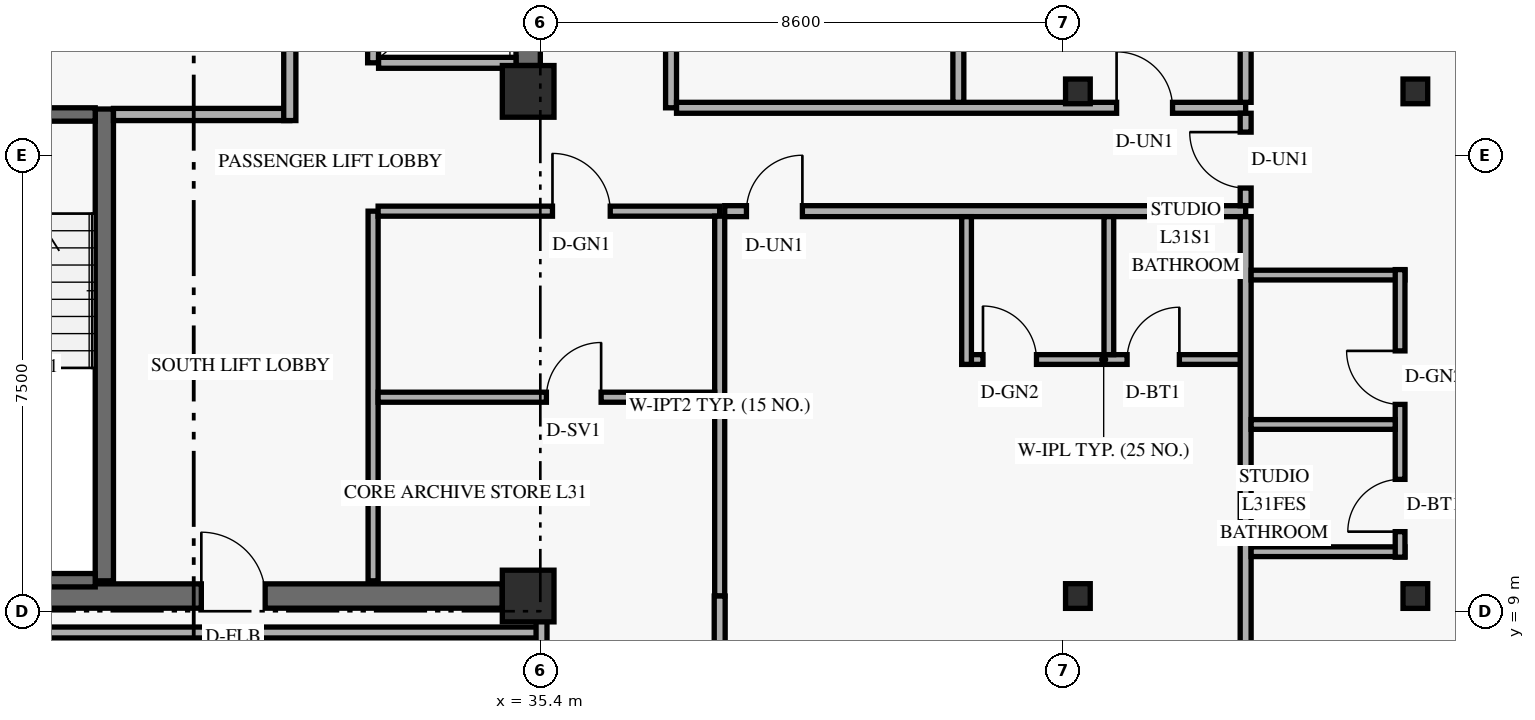
"""IFC4 building model, lengths in metres.
Left out: names, types, materials, properties, quantities, classifications, styles, units other than length and angle.
Written with IfcOpenShell. Run it as: python <this file> out.ifc"""

import sys

from ifc_helpers import new_model, si_unit, direction, frame, frame_2d, origin, origin_2d, place, context, subcontext, project, spatial, rectangle, hollow_rectangle, extrude, element, fill, save


model = new_model("IFC4")
c1 = context("Model", 3, precision=1e-05, world=origin(), true_north=direction((0.0, 1.0)))
c2 = subcontext(c1, "Body", "Model", "MODEL_VIEW")
j1 = project(units=[si_unit("LENGTHUNIT", "METRE"), si_unit("PLANEANGLEUNIT", "RADIAN")], contexts=[c1])
p1 = place(None, origin())
s1 = spatial("IfcSite", under=j1, at=p1, CompositionType="ELEMENT")
p2 = place(p1, origin())
s2 = spatial("IfcBuilding", under=s1, at=p2, CompositionType="ELEMENT")
p3 = place(p2, frame((0.0, 0.0, 121.2)))
s3 = spatial("IfcBuildingStorey", under=s2, at=p3, CompositionType="ELEMENT", Elevation=121.2)
p4 = place(p3, frame((35.2, 17.975, 0.0), z_axis=(0.0, 0.0, 1.0), x_axis=(0.0, 1.0, 0.0)))
e1 = element("IfcWall", 1, at=p4, inside=s3, PredefinedType="SHEAR", context=c2, shape_type="SweptSolid", body=[
    extrude(rectangle(XDim=10.125, YDim=0.4, at=frame_2d((5.062, 0.0))), origin(), (0.0, 0.0, 1.0), 2.749),
])
p5 = place(p3, frame((24.625, 9.25, 0.0), z_axis=(0.0, 0.0, 1.0), x_axis=(1.0, 0.0, 0.0)))
e2 = element("IfcWall", 2, at=p5, inside=s3, PredefinedType="SHEAR", context=c2, shape_type="SweptSolid", body=[
    extrude(rectangle(XDim=10.15, YDim=0.4, at=frame_2d((5.075, 0.0))), origin(), (0.0, 0.0, 1.0), 3.36),
])
p6 = place(p5, frame((5.2, 0.0, 0.0)))
e3 = element("IfcOpeningElement", 3, at=p6, cuts=e2, PredefinedType="OPENING", context=c2, shape_type="SweptSolid", body=[
    extrude(rectangle(XDim=1.05, YDim=2.15, at=frame_2d((0.525, 1.075))), frame((0.0, 0.21, 0.0), z_axis=(0.0, -1.0, 0.0), x_axis=(1.0, 0.0, 0.0)), (0.0, 0.0, 1.0), 0.42),
])
p7 = place(p3, frame((28.23, 9.5, 0.0), z_axis=(0.0, 0.0, 1.0), x_axis=(0.0, 1.0, 0.0)))
e4 = element("IfcWall", 4, at=p7, inside=s3, PredefinedType="SHEAR", context=c2, shape_type="SweptSolid", body=[
    extrude(rectangle(XDim=7.76, YDim=0.3, at=frame_2d((3.88, 0.0))), origin(), (0.0, 0.0, 1.0), 3.36),
])
p8 = place(p3, frame((24.92, 9.51, 0.0), z_axis=(0.0, 0.0, 1.0), x_axis=(1.0, 0.0, 0.0)))
e5 = element("IfcWall", 5, at=p8, inside=s3, PredefinedType="SHEAR", context=c2, shape_type="SweptSolid", body=[
    extrude(rectangle(XDim=3.16, YDim=0.22, at=frame_2d((1.58, 0.0))), origin(), (0.0, 0.0, 1.0), 3.36),
])
p9 = place(p3, frame((24.92, 17.17, 0.0), z_axis=(0.0, 0.0, 1.0), x_axis=(1.0, 0.0, 0.0)))
e6 = element("IfcWall", 6, at=p9, inside=s3, PredefinedType="SHEAR", context=c2, shape_type="SweptSolid", body=[
    extrude(rectangle(XDim=3.16, YDim=0.22, at=frame_2d((1.58, 0.0))), origin(), (0.0, 0.0, 1.0), 3.36),
])
p10 = place(p9, frame((0.78, 0.0, 0.0)))
e7 = element("IfcOpeningElement", 7, at=p10, cuts=e6, PredefinedType="OPENING", context=c2, shape_type="SweptSolid", body=[
    extrude(rectangle(XDim=1.05, YDim=2.15, at=frame_2d((0.525, 1.075))), frame((0.0, 0.12, 0.0), z_axis=(0.0, -1.0, 0.0), x_axis=(1.0, 0.0, 0.0)), (0.0, 0.0, 1.0), 0.24),
])
for number, where, z_axis, x_axis in (
    (8, (35.2, 9.25, 0.0), (0.0, 0.0, 1.0), (1.0, 0.0, 0.0)),
    (9, (35.2, 17.55, 0.0), (0.0, 0.0, 1.0), (1.0, 0.0, 0.0)),
):
    element("IfcColumn", number, at=place(p3, frame(where, z_axis=z_axis, x_axis=x_axis)), inside=s3, PredefinedType="COLUMN", context=c2, shape_type="SweptSolid", body=[
        extrude(rectangle(XDim=0.85, YDim=0.85, at=origin_2d()), origin(), (0.0, 0.0, 1.0), 3.6),
    ])
for number, where, z_axis, x_axis in (
    (10, (44.178, 9.25, 0.0), (0.035, 0.0, 0.999), (0.0, 1.0, 0.0)),
    (11, (44.178, 17.55, 0.0), (0.035, 0.0, 0.999), (0.0, 1.0, 0.0)),
):
    element("IfcColumn", number, at=place(p3, frame(where, z_axis=z_axis, x_axis=x_axis)), inside=s3, PredefinedType="COLUMN", context=c2, shape_type="SweptSolid", body=[
        extrude(hollow_rectangle(XDim=0.406, YDim=0.406, WallThickness=0.016, at=origin_2d()), origin(), (0.0, 0.0, 1.0), 3.602),
    ])
for number, where, z_axis, x_axis in (
    (12, (49.686, 9.25, 0.0), (0.058, 0.0, 0.998), (0.0, 1.0, 0.0)),
    (13, (49.686, 17.55, 0.0), (0.058, 0.0, 0.998), (0.0, 1.0, 0.0)),
):
    element("IfcColumn", number, at=place(p3, frame(where, z_axis=z_axis, x_axis=x_axis)), inside=s3, PredefinedType="COLUMN", context=c2, shape_type="SweptSolid", body=[
        extrude(hollow_rectangle(XDim=0.406, YDim=0.406, WallThickness=0.016, at=origin_2d()), origin(), (0.0, 0.0, 1.0), 3.606),
    ])
p11 = place(p3, frame((28.38, 17.17, 0.0), z_axis=(0.0, 0.0, 1.0), x_axis=(1.0, 0.0, 0.0)))
e14 = element("IfcWall", 14, at=p11, inside=s3, PredefinedType="STANDARD", context=c2, shape_type="SweptSolid", body=[
    extrude(rectangle(XDim=2.9, YDim=0.2, at=frame_2d((1.45, 0.0))), origin(), (0.0, 0.0, 1.0), 3.36),
])
p12 = place(p3, frame((31.28, 17.07, 0.0), z_axis=(0.0, 0.0, 1.0), x_axis=(0.0, 1.0, 0.0)))
e15 = element("IfcWall", 15, at=p12, inside=s3, PredefinedType="STANDARD", context=c2, shape_type="SweptSolid", body=[
    extrude(rectangle(XDim=3.92, YDim=0.2, at=frame_2d((1.96, 0.0))), origin(), (0.0, 0.0, 1.0), 2.731),
])
p13 = place(p12, frame((1.35, 0.0, 0.0)))
e16 = element("IfcOpeningElement", 16, at=p13, cuts=e15, PredefinedType="OPENING", context=c2, shape_type="SweptSolid", body=[
    extrude(rectangle(XDim=1.2, YDim=2.15, at=frame_2d((0.6, 1.075))), frame((0.0, 0.11, 0.0), z_axis=(0.0, -1.0, 0.0), x_axis=(1.0, 0.0, 0.0)), (0.0, 0.0, 1.0), 0.22),
])
p14 = place(p3, frame((32.65, 18.02, 0.0), z_axis=(0.0, 0.0, 1.0), x_axis=(0.0, 1.0, 0.0)))
e17 = element("IfcWall", 17, at=p14, inside=s3, PredefinedType="STANDARD", context=c2, shape_type="SweptSolid", body=[
    extrude(rectangle(XDim=10.06, YDim=0.18, at=frame_2d((5.03, 0.0))), origin(), (0.0, 0.0, 1.0), 3.36),
])
p15 = place(p3, frame((32.74, 18.02, 0.0), z_axis=(0.0, 0.0, 1.0), x_axis=(1.0, 0.0, 0.0)))
e18 = element("IfcWall", 18, at=p15, inside=s3, PredefinedType="STANDARD", context=c2, shape_type="SweptSolid", body=[
    extrude(rectangle(XDim=2.26, YDim=0.18, at=frame_2d((1.13, 0.0))), origin(), (0.0, 0.0, 1.0), 3.36),
])
p16 = place(p3, frame((32.65, 9.5, 0.0), z_axis=(0.0, 0.0, 1.0), x_axis=(0.0, 1.0, 0.0)))
e19 = element("IfcWall", 19, at=p16, inside=s3, PredefinedType="PARTITIONING", context=c2, shape_type="SweptSolid", body=[
    extrude(rectangle(XDim=6.08, YDim=0.165, at=frame_2d((3.04, 0.0))), origin(), (0.0, 0.0, 1.0), 3.36),
])
p17 = place(p3, frame((32.732, 15.58, 0.0), z_axis=(0.0, 0.0, 1.0), x_axis=(1.0, 0.0, 0.0)))
e20 = element("IfcWall", 20, at=p17, inside=s3, PredefinedType="PARTITIONING", context=c2, shape_type="SweptSolid", body=[
    extrude(rectangle(XDim=5.618, YDim=0.165, at=frame_2d((2.809, 0.0))), origin(), (0.0, 0.0, 1.0), 2.731),
])
p18 = place(p17, frame((2.867, 0.0, 0.0)))
e21 = element("IfcOpeningElement", 21, at=p18, cuts=e20, PredefinedType="OPENING", context=c2, shape_type="SweptSolid", body=[
    extrude(rectangle(XDim=0.95, YDim=2.15, at=frame_2d((0.475, 1.075))), frame((0.0, 0.093, 0.0), z_axis=(0.0, -1.0, 0.0), x_axis=(1.0, 0.0, 0.0)), (0.0, 0.0, 1.0), 0.185),
])
p19 = place(p3, frame((38.35, 9.25, 0.0), z_axis=(0.0, 0.0, 1.0), x_axis=(0.0, 1.0, 0.0)))
e22 = element("IfcWall", 22, at=p19, inside=s3, PredefinedType="PARTITIONING", context=c2, shape_type="SweptSolid", body=[
    extrude(rectangle(XDim=6.248, YDim=0.165, at=frame_2d((3.124, 0.0))), origin(), (0.0, 0.0, 1.0), 2.731),
])
p20 = place(p3, frame((32.732, 12.52, 0.0), z_axis=(0.0, 0.0, 1.0), x_axis=(1.0, 0.0, 0.0)))
e23 = element("IfcWall", 23, at=p20, inside=s3, PredefinedType="PARTITIONING", context=c2, shape_type="SweptSolid", body=[
    extrude(rectangle(XDim=5.535, YDim=0.165, at=frame_2d((2.768, 0.0))), origin(), (0.0, 0.0, 1.0), 2.731),
])
p21 = place(p20, frame((2.768, 0.0, 0.0)))
e24 = element("IfcOpeningElement", 24, at=p21, cuts=e23, PredefinedType="OPENING", context=c2, shape_type="SweptSolid", body=[
    extrude(rectangle(XDim=0.9, YDim=2.1, at=frame_2d((0.45, 1.05))), frame((0.0, 0.093, 0.0), z_axis=(0.0, -1.0, 0.0), x_axis=(1.0, 0.0, 0.0)), (0.0, 0.0, 1.0), 0.185),
])
p22 = place(p3, frame((37.55, 17.28, 0.0), z_axis=(0.0, 0.0, 1.0), x_axis=(0.0, 1.0, 0.0)))
e25 = element("IfcWall", 25, at=p22, inside=s3, PredefinedType="STANDARD", context=c2, shape_type="SweptSolid", body=[
    extrude(rectangle(XDim=10.28, YDim=0.18, at=frame_2d((5.14, 0.0))), origin(), (0.0, 0.0, 1.0), 2.731),
])
p23 = place(p22, frame((1.94, 0.0, 0.0)))
e26 = element("IfcOpeningElement", 26, at=p23, cuts=e25, PredefinedType="OPENING", context=c2, shape_type="SweptSolid", body=[
    extrude(rectangle(XDim=0.95, YDim=2.15, at=frame_2d((0.475, 1.075))), frame((0.0, 0.1, 0.0), z_axis=(0.0, -1.0, 0.0), x_axis=(1.0, 0.0, 0.0)), (0.0, 0.0, 1.0), 0.2),
])
p24 = place(p22, frame((6.99, 0.0, 0.0)))
e27 = element("IfcOpeningElement", 27, at=p24, cuts=e25, PredefinedType="OPENING", context=c2, shape_type="SweptSolid", body=[
    extrude(rectangle(XDim=0.95, YDim=2.15, at=frame_2d((0.475, 1.075))), frame((0.0, 0.1, 0.0), z_axis=(0.0, -1.0, 0.0), x_axis=(1.0, 0.0, 0.0)), (0.0, 0.0, 1.0), 0.2),
])
p25 = place(p3, frame((38.433, 15.58, 0.0), z_axis=(0.0, 0.0, 1.0), x_axis=(1.0, 0.0, 0.0)))
e28 = element("IfcWall", 28, at=p25, inside=s3, PredefinedType="STANDARD", context=c2, shape_type="SweptSolid", body=[
    extrude(rectangle(XDim=8.567, YDim=0.18, at=frame_2d((4.284, 0.0))), origin(), (0.0, 0.0, 1.0), 2.731),
])
p26 = place(p25, frame((0.357, 0.0, 0.0)))
e29 = element("IfcOpeningElement", 29, at=p26, cuts=e28, PredefinedType="OPENING", context=c2, shape_type="SweptSolid", body=[
    extrude(rectangle(XDim=0.92, YDim=2.15, at=frame_2d((0.46, 1.075))), frame((0.0, 0.1, 0.0), z_axis=(0.0, -1.0, 0.0), x_axis=(1.0, 0.0, 0.0)), (0.0, 0.0, 1.0), 0.2),
])
p27 = place(p3, frame((37.64, 17.28, 0.0), z_axis=(0.0, 0.0, 1.0), x_axis=(1.0, 0.0, 0.0)))
e30 = element("IfcWall", 30, at=p27, inside=s3, PredefinedType="STANDARD", context=c2, shape_type="SweptSolid", body=[
    extrude(rectangle(XDim=9.36, YDim=0.18, at=frame_2d((4.68, 0.0))), origin(), (0.0, 0.0, 1.0), 2.731),
])
p28 = place(p27, frame((7.238, 0.0, 0.0)))
e31 = element("IfcOpeningElement", 31, at=p28, cuts=e30, PredefinedType="OPENING", context=c2, shape_type="SweptSolid", body=[
    extrude(rectangle(XDim=0.92, YDim=2.15, at=frame_2d((0.46, 1.075))), frame((0.0, 0.1, 0.0), z_axis=(0.0, -1.0, 0.0), x_axis=(1.0, 0.0, 0.0)), (0.0, 0.0, 1.0), 0.2),
])
p29 = place(p3, frame((23.85, 8.65, 0.0), z_axis=(0.0, 0.0, 1.0), x_axis=(1.0, 0.0, 0.0)))
e32 = element("IfcWall", 32, at=p29, inside=s3, PredefinedType="STANDARD", context=c2, shape_type="SweptSolid", body=[
    extrude(rectangle(XDim=11.57, YDim=0.18, at=frame_2d((5.785, 0.0))), origin(), (0.0, 0.0, 1.0), 2.731),
])
p30 = place(p3, frame((35.42, 2.98, 0.0), z_axis=(0.0, 0.0, 1.0), x_axis=(0.0, 1.0, 0.0)))
e33 = element("IfcWall", 33, at=p30, inside=s3, PredefinedType="PARTITIONING", context=c2, shape_type="SweptSolid", body=[
    extrude(rectangle(XDim=6.27, YDim=0.18, at=frame_2d((3.135, 0.0))), origin(), (0.0, 0.0, 1.0), 2.731),
])
p31 = place(p30, frame((1.57, 0.0, 0.0)))
e34 = element("IfcOpeningElement", 34, at=p31, cuts=e33, PredefinedType="OPENING", context=c2, shape_type="SweptSolid", body=[
    extrude(rectangle(XDim=0.88, YDim=2.12, at=frame_2d((0.44, 1.06))), frame((0.0, 0.1, 0.0), z_axis=(0.0, -1.0, 0.0), x_axis=(1.0, 0.0, 0.0)), (0.0, 0.0, 1.0), 0.2),
])
p32 = place(p3, frame((38.35, 2.98, 0.0), z_axis=(0.0, 0.0, 1.0), x_axis=(0.0, 1.0, 0.0)))
e35 = element("IfcWall", 35, at=p32, inside=s3, PredefinedType="PARTITIONING", context=c2, shape_type="SweptSolid", body=[
    extrude(rectangle(XDim=6.27, YDim=0.18, at=frame_2d((3.135, 0.0))), origin(), (0.0, 0.0, 1.0), 2.731),
])
p33 = place(p3, frame((42.33, 13.14, 0.0), z_axis=(0.0, 0.0, 1.0), x_axis=(1.0, 0.0, 0.0)))
e36 = element("IfcWall", 36, at=p33, inside=s3, PredefinedType="PLUMBINGWALL", context=c2, shape_type="SweptSolid", body=[
    extrude(rectangle(XDim=4.67, YDim=0.16, at=frame_2d((2.335, 0.0))), origin(), (0.0, 0.0, 1.0), 2.731),
])
p34 = place(p33, frame((0.35, 0.0, 0.0)))
e37 = element("IfcOpeningElement", 37, at=p34, cuts=e36, PredefinedType="OPENING", context=c2, shape_type="SweptSolid", body=[
    extrude(rectangle(XDim=0.88, YDim=2.12, at=frame_2d((0.44, 1.06))), frame((0.0, 0.09, 0.0), z_axis=(0.0, -1.0, 0.0), x_axis=(1.0, 0.0, 0.0)), (0.0, 0.0, 1.0), 0.18),
])
p35 = place(p33, frame((2.72, 0.0, 0.0)))
e38 = element("IfcOpeningElement", 38, at=p35, cuts=e36, PredefinedType="OPENING", context=c2, shape_type="SweptSolid", body=[
    extrude(rectangle(XDim=0.86, YDim=2.12, at=frame_2d((0.43, 1.06))), frame((0.0, 0.09, 0.0), z_axis=(0.0, -1.0, 0.0), x_axis=(1.0, 0.0, 0.0)), (0.0, 0.0, 1.0), 0.18),
])
p36 = place(p3, frame((42.41, 13.06, 0.0), z_axis=(0.0, 0.0, 1.0), x_axis=(0.0, 1.0, 0.0)))
e39 = element("IfcWall", 39, at=p36, inside=s3, PredefinedType="PLUMBINGWALL", context=c2, shape_type="SweptSolid", body=[
    extrude(rectangle(XDim=2.43, YDim=0.16, at=frame_2d((1.215, 0.0))), origin(), (0.0, 0.0, 1.0), 2.988),
])
p37 = place(p3, frame((44.75, 13.22, 0.0), z_axis=(0.0, 0.0, 1.0), x_axis=(0.0, 1.0, 0.0)))
e40 = element("IfcWall", 40, at=p37, inside=s3, PredefinedType="PLUMBINGWALL", context=c2, shape_type="SweptSolid", body=[
    extrude(rectangle(XDim=2.27, YDim=0.16, at=frame_2d((1.135, 0.0))), origin(), (0.0, 0.0, 1.0), 2.988),
])
p38 = place(p3, frame((42.275, 17.37, 0.0), z_axis=(0.0, 0.0, 1.0), x_axis=(0.0, 1.0, 0.0)))
e41 = element("IfcWall", 41, at=p38, inside=s3, PredefinedType="PARTITIONING", context=c2, shape_type="SweptSolid", body=[
    extrude(rectangle(XDim=10.1, YDim=0.18, at=frame_2d((5.05, 0.0))), origin(), (0.0, 0.0, 1.0), 2.731),
])
p39 = place(p3, frame((47.0, 15.67, 0.0), z_axis=(0.0, 0.0, 1.0), x_axis=(0.0, 1.0, 0.0)))
e42 = element("IfcWall", 42, at=p39, inside=s3, PredefinedType="STANDARD", context=c2, shape_type="SweptSolid", body=[
    extrude(rectangle(XDim=1.52, YDim=0.18, at=frame_2d((0.76, 0.0))), origin(), (0.0, 0.0, 1.0), 3.36),
])
p40 = place(p39, frame((0.29, 0.0, 0.0)))
e43 = element("IfcOpeningElement", 43, at=p40, cuts=e42, PredefinedType="OPENING", context=c2, shape_type="SweptSolid", body=[
    extrude(rectangle(XDim=0.92, YDim=2.15, at=frame_2d((0.46, 1.075))), frame((0.0, 0.1, 0.0), z_axis=(0.0, -1.0, 0.0), x_axis=(1.0, 0.0, 0.0)), (0.0, 0.0, 1.0), 0.2),
])
p41 = place(p3, frame((47.0, 2.98, 0.0), z_axis=(0.0, 0.0, 1.0), x_axis=(0.0, 1.0, 0.0)))
e44 = element("IfcWall", 44, at=p41, inside=s3, PredefinedType="PARTITIONING", context=c2, shape_type="SweptSolid", body=[
    extrude(rectangle(XDim=12.51, YDim=0.18, at=frame_2d((6.255, 0.0))), origin(), (0.0, 0.0, 1.0), 2.731),
])
p42 = place(p3, frame((47.0, 17.37, 0.0), z_axis=(0.0, 0.0, 1.0), x_axis=(0.0, 1.0, 0.0)))
e45 = element("IfcWall", 45, at=p42, inside=s3, PredefinedType="PARTITIONING", context=c2, shape_type="SweptSolid", body=[
    extrude(rectangle(XDim=10.1, YDim=0.18, at=frame_2d((5.05, 0.0))), origin(), (0.0, 0.0, 1.0), 2.731),
])
for number, where, z_axis, x_axis in (
    (46, (47.09, 9.979, 0.0), (0.0, 0.0, 1.0), (1.0, 0.0, 0.0)),
    (47, (47.09, 14.529, 0.0), (0.0, 0.0, 1.0), (1.0, 0.0, 0.0)),
):
    element("IfcWall", number, at=place(p3, frame(where, z_axis=z_axis, x_axis=x_axis)), inside=s3, PredefinedType="PLUMBINGWALL", context=c2, shape_type="SweptSolid", body=[
        extrude(rectangle(XDim=2.53, YDim=0.16, at=frame_2d((1.265, 0.0))), origin(), (0.0, 0.0, 1.0), 3.36),
    ])
p43 = place(p3, frame((49.54, 9.889, 0.0), z_axis=(0.0, 0.0, 1.0), x_axis=(0.0, 1.0, 0.0)))
e48 = element("IfcWall", 48, at=p43, inside=s3, PredefinedType="PLUMBINGWALL", context=c2, shape_type="SweptSolid", body=[
    extrude(rectangle(XDim=4.73, YDim=0.16, at=frame_2d((2.365, 0.0))), origin(), (0.0, 0.0, 1.0), 2.988),
])
p44 = place(p43, frame((0.42, 0.0, 0.0)))
e49 = element("IfcOpeningElement", 49, at=p44, cuts=e48, PredefinedType="OPENING", context=c2, shape_type="SweptSolid", body=[
    extrude(rectangle(XDim=0.86, YDim=2.12, at=frame_2d((0.43, 1.06))), frame((0.0, 0.09, 0.0), z_axis=(0.0, -1.0, 0.0), x_axis=(1.0, 0.0, 0.0)), (0.0, 0.0, 1.0), 0.18),
])
p45 = place(p43, frame((2.513, 0.0, 0.0)))
e50 = element("IfcOpeningElement", 50, at=p45, cuts=e48, PredefinedType="OPENING", context=c2, shape_type="SweptSolid", body=[
    extrude(rectangle(XDim=0.88, YDim=2.12, at=frame_2d((0.44, 1.06))), frame((0.0, 0.09, 0.0), z_axis=(0.0, -1.0, 0.0), x_axis=(1.0, 0.0, 0.0)), (0.0, 0.0, 1.0), 0.18),
])
p46 = place(p3, frame((47.09, 12.072, 0.0), z_axis=(0.0, 0.0, 1.0), x_axis=(1.0, 0.0, 0.0)))
e51 = element("IfcWall", 51, at=p46, inside=s3, PredefinedType="PLUMBINGWALL", context=c2, shape_type="SweptSolid", body=[
    extrude(rectangle(XDim=2.37, YDim=0.16, at=frame_2d((1.185, 0.0))), origin(), (0.0, 0.0, 1.0), 3.36),
])
p47 = place(p18, origin())
e52 = element("IfcDoor", 52, at=p47, inside=s3, OperationType="SINGLE_SWING_LEFT", PredefinedType="DOOR", context=c2, shape_type="SweptSolid", body=[
    extrude(rectangle(XDim=0.95, YDim=2.15, at=frame_2d((0.475, 1.075))), frame((0.0, 0.025, 0.0), z_axis=(0.0, -1.0, 0.0), x_axis=(1.0, 0.0, 0.0)), (0.0, 0.0, 1.0), 0.05),
])
fill(e21, e52)
p48 = place(p21, origin())
e53 = element("IfcDoor", 53, at=p48, inside=s3, OperationType="SINGLE_SWING_RIGHT", PredefinedType="DOOR", context=c2, shape_type="SweptSolid", body=[
    extrude(rectangle(XDim=0.9, YDim=2.1, at=frame_2d((0.45, 1.05))), frame((0.0, 0.025, 0.0), z_axis=(0.0, -1.0, 0.0), x_axis=(1.0, 0.0, 0.0)), (0.0, 0.0, 1.0), 0.05),
])
fill(e24, e53)
p49 = place(p6, origin())
e54 = element("IfcDoor", 54, at=p49, inside=s3, OperationType="SINGLE_SWING_LEFT", PredefinedType="DOOR", context=c2, shape_type="SweptSolid", body=[
    extrude(rectangle(XDim=1.05, YDim=2.15, at=frame_2d((0.525, 1.075))), frame((0.0, 0.025, 0.0), z_axis=(0.0, -1.0, 0.0), x_axis=(1.0, 0.0, 0.0)), (0.0, 0.0, 1.0), 0.05),
])
fill(e3, e54)
p50 = place(p26, origin())
e55 = element("IfcDoor", 55, at=p50, inside=s3, OperationType="SINGLE_SWING_RIGHT", PredefinedType="DOOR", context=c2, shape_type="SweptSolid", body=[
    extrude(rectangle(XDim=0.92, YDim=2.15, at=frame_2d((0.46, 1.075))), frame((0.0, 0.025, 0.0), z_axis=(0.0, -1.0, 0.0), x_axis=(1.0, 0.0, 0.0)), (0.0, 0.0, 1.0), 0.05),
])
fill(e29, e55)
p51 = place(p34, origin())
e56 = element("IfcDoor", 56, at=p51, inside=s3, OperationType="SINGLE_SWING_LEFT", PredefinedType="DOOR", context=c2, shape_type="SweptSolid", body=[
    extrude(rectangle(XDim=0.88, YDim=2.12, at=frame_2d((0.44, 1.06))), frame((0.0, 0.025, 0.0), z_axis=(0.0, -1.0, 0.0), x_axis=(1.0, 0.0, 0.0)), (0.0, 0.0, 1.0), 0.05),
])
fill(e37, e56)
p52 = place(p35, origin())
e57 = element("IfcDoor", 57, at=p52, inside=s3, OperationType="SINGLE_SWING_RIGHT", PredefinedType="DOOR", context=c2, shape_type="SweptSolid", body=[
    extrude(rectangle(XDim=0.86, YDim=2.12, at=frame_2d((0.43, 1.06))), frame((0.0, 0.025, 0.0), z_axis=(0.0, -1.0, 0.0), x_axis=(1.0, 0.0, 0.0)), (0.0, 0.0, 1.0), 0.05),
])
fill(e38, e57)
p53 = place(p28, origin())
e58 = element("IfcDoor", 58, at=p53, inside=s3, OperationType="SINGLE_SWING_LEFT", PredefinedType="DOOR", context=c2, shape_type="SweptSolid", body=[
    extrude(rectangle(XDim=0.92, YDim=2.15, at=frame_2d((0.46, 1.075))), frame((0.0, 0.025, 0.0), z_axis=(0.0, -1.0, 0.0), x_axis=(1.0, 0.0, 0.0)), (0.0, 0.0, 1.0), 0.05),
])
fill(e31, e58)
p54 = place(p40, origin())
e59 = element("IfcDoor", 59, at=p54, inside=s3, OperationType="SINGLE_SWING_RIGHT", PredefinedType="DOOR", context=c2, shape_type="SweptSolid", body=[
    extrude(rectangle(XDim=0.92, YDim=2.15, at=frame_2d((0.46, 1.075))), frame((0.0, 0.025, 0.0), z_axis=(0.0, -1.0, 0.0), x_axis=(1.0, 0.0, 0.0)), (0.0, 0.0, 1.0), 0.05),
])
fill(e43, e59)
p55 = place(p44, origin())
e60 = element("IfcDoor", 60, at=p55, inside=s3, OperationType="SINGLE_SWING_LEFT", PredefinedType="DOOR", context=c2, shape_type="SweptSolid", body=[
    extrude(rectangle(XDim=0.86, YDim=2.12, at=frame_2d((0.43, 1.06))), frame((0.0, 0.025, 0.0), z_axis=(0.0, -1.0, 0.0), x_axis=(1.0, 0.0, 0.0)), (0.0, 0.0, 1.0), 0.05),
])
fill(e49, e60)
p56 = place(p45, origin())
e61 = element("IfcDoor", 61, at=p56, inside=s3, OperationType="SINGLE_SWING_RIGHT", PredefinedType="DOOR", context=c2, shape_type="SweptSolid", body=[
    extrude(rectangle(XDim=0.88, YDim=2.12, at=frame_2d((0.44, 1.06))), frame((0.0, 0.025, 0.0), z_axis=(0.0, -1.0, 0.0), x_axis=(1.0, 0.0, 0.0)), (0.0, 0.0, 1.0), 0.05),
])
fill(e50, e61)
save(model, sys.argv[1])
